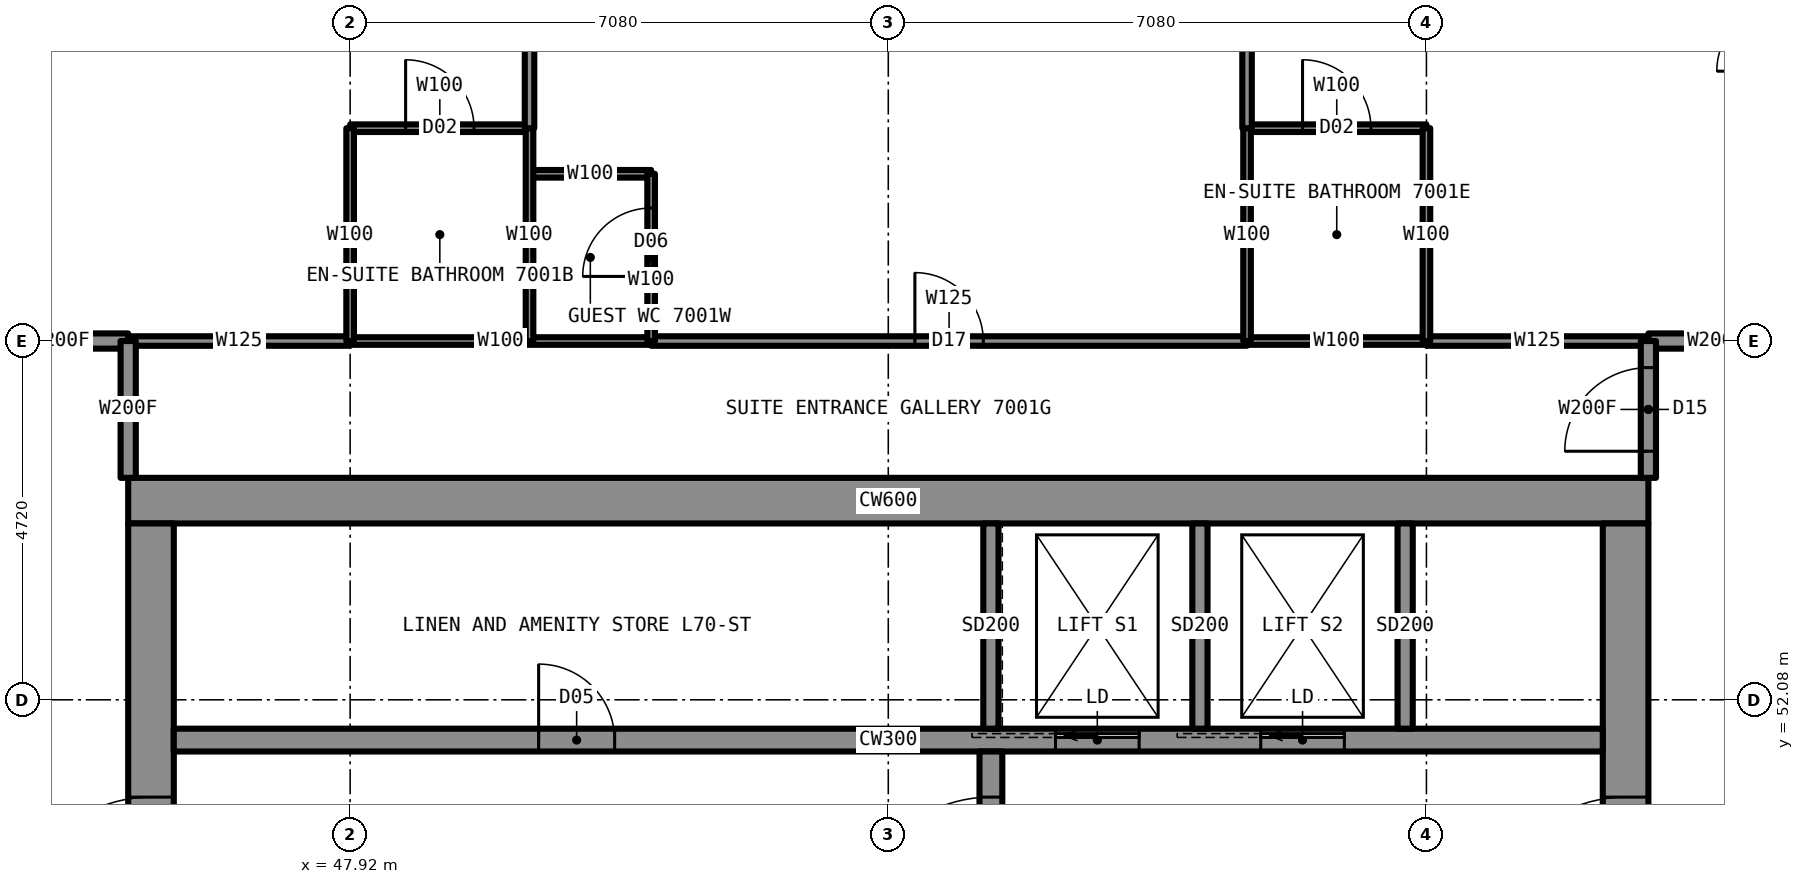
"""IFC4 building model, lengths in metres.
Left out: names, types, materials, properties, quantities, classifications, styles, units other than length and angle.
Written with IfcOpenShell. Run it as: python <this file> out.ifc"""

import sys

from ifc_helpers import new_model, si_unit, direction, frame, frame_2d, origin, place, context, subcontext, project, spatial, rectangle, extrude, element, fill, save


model = new_model("IFC4")
c1 = context("Model", 3, precision=1e-05, world=origin(), true_north=direction((0.0, 1.0)))
c2 = subcontext(c1, "Body", "Model", "MODEL_VIEW")
j1 = project(units=[si_unit("LENGTHUNIT", "METRE"), si_unit("PLANEANGLEUNIT", "RADIAN")], contexts=[c1])
p1 = place(None, origin())
s1 = spatial("IfcSite", under=j1, at=p1, CompositionType="ELEMENT")
p2 = place(p1, origin())
s2 = spatial("IfcBuilding", under=s1, at=p2, CompositionType="ELEMENT")
p3 = place(p2, frame((0.0, 0.0, 254.7)))
s3 = spatial("IfcBuildingStorey", under=s2, at=p3, CompositionType="ELEMENT", Elevation=254.7)
p4 = place(p3, frame((45.0, 54.7, 0.0), z_axis=(0.0, 0.0, 1.0), x_axis=(1.0, 0.0, 0.0)))
e1 = element("IfcWall", 1, at=p4, inside=s3, PredefinedType="SHEAR", context=c2, shape_type="SweptSolid", body=[
    extrude(rectangle(XDim=20.0, YDim=0.6, at=frame_2d((10.0, 0.0))), origin(), (0.0, 0.0, 1.0), 3.5),
])
p5 = place(p3, frame((64.7, 35.6, 0.0), z_axis=(0.0, 0.0, 1.0), x_axis=(0.0, 1.0, 0.0)))
e2 = element("IfcWall", 2, at=p5, inside=s3, PredefinedType="SHEAR", context=c2, shape_type="SweptSolid", body=[
    extrude(rectangle(XDim=18.8, YDim=0.6, at=frame_2d((9.4, 0.0))), origin(), (0.0, 0.0, 1.0), 3.5),
])
p6 = place(p5, frame((13.4, 0.0, 0.0)))
e3 = element("IfcOpeningElement", 3, at=p6, cuts=e2, PredefinedType="OPENING", context=c2, shape_type="SweptSolid", body=[
    extrude(rectangle(XDim=1.8, YDim=2.2, at=frame_2d((0.9, 1.1))), frame((0.0, 0.31, 0.0), z_axis=(0.0, -1.0, 0.0), x_axis=(1.0, 0.0, 0.0)), (0.0, 0.0, 1.0), 0.62),
])
p7 = place(p5, frame((3.6, 0.0, 0.0)))
e4 = element("IfcOpeningElement", 4, at=p7, cuts=e2, PredefinedType="OPENING", context=c2, shape_type="SweptSolid", body=[
    extrude(rectangle(XDim=1.8, YDim=2.2, at=frame_2d((0.9, 1.1))), frame((0.0, 0.31, 0.0), z_axis=(0.0, -1.0, 0.0), x_axis=(1.0, 0.0, 0.0)), (0.0, 0.0, 1.0), 0.62),
])
p8 = place(p3, frame((45.3, 35.6, 0.0), z_axis=(0.0, 0.0, 1.0), x_axis=(0.0, 1.0, 0.0)))
e5 = element("IfcWall", 5, at=p8, inside=s3, PredefinedType="SHEAR", context=c2, shape_type="SweptSolid", body=[
    extrude(rectangle(XDim=18.8, YDim=0.6, at=frame_2d((9.4, 0.0))), origin(), (0.0, 0.0, 1.0), 3.5),
])
p9 = place(p8, frame((13.4, 0.0, 0.0)))
e6 = element("IfcOpeningElement", 6, at=p9, cuts=e5, PredefinedType="OPENING", context=c2, shape_type="SweptSolid", body=[
    extrude(rectangle(XDim=1.8, YDim=2.2, at=frame_2d((0.9, 1.1))), frame((0.0, 0.31, 0.0), z_axis=(0.0, -1.0, 0.0), x_axis=(1.0, 0.0, 0.0)), (0.0, 0.0, 1.0), 0.62),
])
p10 = place(p8, frame((3.6, 0.0, 0.0)))
e7 = element("IfcOpeningElement", 7, at=p10, cuts=e5, PredefinedType="OPENING", context=c2, shape_type="SweptSolid", body=[
    extrude(rectangle(XDim=1.8, YDim=2.2, at=frame_2d((0.9, 1.1))), frame((0.0, 0.31, 0.0), z_axis=(0.0, -1.0, 0.0), x_axis=(1.0, 0.0, 0.0)), (0.0, 0.0, 1.0), 0.62),
])
p11 = place(p8, frame((6.4, 0.0, 0.0)))
e8 = element("IfcOpeningElement", 8, at=p11, cuts=e5, PredefinedType="OPENING", context=c2, shape_type="SweptSolid", body=[
    extrude(rectangle(XDim=1.2, YDim=2.2, at=frame_2d((0.6, 1.1))), frame((0.0, 0.31, 0.0), z_axis=(0.0, -1.0, 0.0), x_axis=(1.0, 0.0, 0.0)), (0.0, 0.0, 1.0), 0.62),
])
p12 = place(p3, frame((45.6, 51.55, 0.0), z_axis=(0.0, 0.0, 1.0), x_axis=(1.0, 0.0, 0.0)))
e9 = element("IfcWall", 9, at=p12, inside=s3, PredefinedType="SHEAR", context=c2, shape_type="SweptSolid", body=[
    extrude(rectangle(XDim=18.8, YDim=0.3, at=frame_2d((9.4, 0.0))), origin(), (0.0, 0.0, 1.0), 3.5),
])
p13 = place(p12, frame((4.8, 0.0, 0.0)))
e10 = element("IfcOpeningElement", 10, at=p13, cuts=e9, PredefinedType="OPENING", context=c2, shape_type="SweptSolid", body=[
    extrude(rectangle(XDim=1.0, YDim=2.1, at=frame_2d((0.5, 1.05))), frame((0.0, 0.16, 0.0), z_axis=(0.0, -1.0, 0.0), x_axis=(1.0, 0.0, 0.0)), (0.0, 0.0, 1.0), 0.32),
])
p14 = place(p12, frame((11.6, 0.0, 0.0)))
e11 = element("IfcOpeningElement", 11, at=p14, cuts=e9, PredefinedType="OPENING", context=c2, shape_type="SweptSolid", body=[
    extrude(rectangle(XDim=1.1, YDim=2.2, at=frame_2d((0.55, 1.1))), frame((0.0, 0.16, 0.0), z_axis=(0.0, -1.0, 0.0), x_axis=(1.0, 0.0, 0.0)), (0.0, 0.0, 1.0), 0.32),
])
p15 = place(p12, frame((14.3, 0.0, 0.0)))
e12 = element("IfcOpeningElement", 12, at=p15, cuts=e9, PredefinedType="OPENING", context=c2, shape_type="SweptSolid", body=[
    extrude(rectangle(XDim=1.1, YDim=2.2, at=frame_2d((0.55, 1.1))), frame((0.0, 0.16, 0.0), z_axis=(0.0, -1.0, 0.0), x_axis=(1.0, 0.0, 0.0)), (0.0, 0.0, 1.0), 0.32),
])
p16 = place(p3, frame((56.35, 41.9, 0.0), z_axis=(0.0, 0.0, 1.0), x_axis=(0.0, 1.0, 0.0)))
e13 = element("IfcWall", 13, at=p16, inside=s3, PredefinedType="SHEAR", context=c2, shape_type="SweptSolid", body=[
    extrude(rectangle(XDim=9.5, YDim=0.3, at=frame_2d((4.75, 0.0))), origin(), (0.0, 0.0, 1.0), 3.5),
])
p17 = place(p16, frame((7.1, 0.0, 0.0)))
e14 = element("IfcOpeningElement", 14, at=p17, cuts=e13, PredefinedType="OPENING", context=c2, shape_type="SweptSolid", body=[
    extrude(rectangle(XDim=1.8, YDim=2.2, at=frame_2d((0.9, 1.1))), frame((0.0, 0.16, 0.0), z_axis=(0.0, -1.0, 0.0), x_axis=(1.0, 0.0, 0.0)), (0.0, 0.0, 1.0), 0.32),
])
p18 = place(p3, frame((47.92, 56.8, 0.0), z_axis=(0.0, 0.0, 1.0), x_axis=(1.0, 0.0, 0.0)))
e15 = element("IfcWall", 15, at=p18, inside=s3, PredefinedType="PARTITIONING", context=c2, shape_type="SweptSolid", body=[
    extrude(rectangle(XDim=3.96, YDim=0.1, at=frame_2d((1.98, 0.0))), origin(), (0.0, 0.0, 1.0), 3.33),
])
p19 = place(p3, frame((59.72, 56.8, 0.0), z_axis=(0.0, 0.0, 1.0), x_axis=(1.0, 0.0, 0.0)))
e16 = element("IfcWall", 16, at=p19, inside=s3, PredefinedType="PARTITIONING", context=c2, shape_type="SweptSolid", body=[
    extrude(rectangle(XDim=2.36, YDim=0.1, at=frame_2d((1.18, 0.0))), origin(), (0.0, 0.0, 1.0), 3.33),
])
for number, where, z_axis, x_axis in (
    (17, (43.22, 56.8, 0.0), (0.0, 0.0, 1.0), (1.0, 0.0, 0.0)),
    (18, (65.0, 56.8, 0.0), (0.0, 0.0, 1.0), (1.0, 0.0, 0.0)),
):
    element("IfcWall", number, at=place(p3, frame(where, z_axis=z_axis, x_axis=x_axis)), inside=s3, PredefinedType="PARTITIONING", context=c2, shape_type="SweptSolid", body=[
        extrude(rectangle(XDim=1.78, YDim=0.2, at=frame_2d((0.89, 0.0))), origin(), (0.0, 0.0, 1.0), 3.33),
    ])
p20 = place(p3, frame((45.0, 56.8, 0.0), z_axis=(0.0, 0.0, 1.0), x_axis=(1.0, 0.0, 0.0)))
e19 = element("IfcWall", 19, at=p20, inside=s3, PredefinedType="PARTITIONING", context=c2, shape_type="SweptSolid", body=[
    extrude(rectangle(XDim=2.92, YDim=0.125, at=frame_2d((1.46, 0.0))), origin(), (0.0, 0.0, 1.0), 3.33),
])
p21 = place(p3, frame((51.88, 56.8, 0.0), z_axis=(0.0, 0.0, 1.0), x_axis=(1.0, 0.0, 0.0)))
e20 = element("IfcWall", 20, at=p21, inside=s3, PredefinedType="PARTITIONING", context=c2, shape_type="SweptSolid", body=[
    extrude(rectangle(XDim=7.84, YDim=0.125, at=frame_2d((3.92, 0.0))), origin(), (0.0, 0.0, 1.0), 3.33),
])
p22 = place(p21, frame((3.47, 0.0, 0.0)))
e21 = element("IfcOpeningElement", 21, at=p22, cuts=e20, PredefinedType="OPENING", context=c2, shape_type="SweptSolid", body=[
    extrude(rectangle(XDim=0.9, YDim=2.2, at=frame_2d((0.45, 1.1))), frame((0.0, 0.073, 0.0), z_axis=(0.0, -1.0, 0.0), x_axis=(1.0, 0.0, 0.0)), (0.0, 0.0, 1.0), 0.145),
])
p23 = place(p3, frame((62.08, 56.8, 0.0), z_axis=(0.0, 0.0, 1.0), x_axis=(1.0, 0.0, 0.0)))
e22 = element("IfcWall", 22, at=p23, inside=s3, PredefinedType="PARTITIONING", context=c2, shape_type="SweptSolid", body=[
    extrude(rectangle(XDim=2.92, YDim=0.125, at=frame_2d((1.46, 0.0))), origin(), (0.0, 0.0, 1.0), 3.33),
])
p24 = place(p3, frame((50.28, 59.0, 0.0), z_axis=(0.0, 0.0, 1.0), x_axis=(1.0, 0.0, 0.0)))
e23 = element("IfcWall", 23, at=p24, inside=s3, PredefinedType="PARTITIONING", context=c2, shape_type="SweptSolid", body=[
    extrude(rectangle(XDim=1.6, YDim=0.1, at=frame_2d((0.8, 0.0))), origin(), (0.0, 0.0, 1.0), 3.33),
])
p25 = place(p3, frame((47.92, 59.6, 0.0), z_axis=(0.0, 0.0, 1.0), x_axis=(1.0, 0.0, 0.0)))
e24 = element("IfcWall", 24, at=p25, inside=s3, PredefinedType="PARTITIONING", context=c2, shape_type="SweptSolid", body=[
    extrude(rectangle(XDim=2.36, YDim=0.1, at=frame_2d((1.18, 0.0))), origin(), (0.0, 0.0, 1.0), 3.33),
])
p26 = place(p25, frame((0.73, 0.0, 0.0)))
e25 = element("IfcOpeningElement", 25, at=p26, cuts=e24, PredefinedType="OPENING", context=c2, shape_type="SweptSolid", body=[
    extrude(rectangle(XDim=0.9, YDim=2.1, at=frame_2d((0.45, 1.05))), frame((0.0, 0.06, 0.0), z_axis=(0.0, -1.0, 0.0), x_axis=(1.0, 0.0, 0.0)), (0.0, 0.0, 1.0), 0.12),
])
p27 = place(p3, frame((59.72, 59.6, 0.0), z_axis=(0.0, 0.0, 1.0), x_axis=(1.0, 0.0, 0.0)))
e26 = element("IfcWall", 26, at=p27, inside=s3, PredefinedType="PARTITIONING", context=c2, shape_type="SweptSolid", body=[
    extrude(rectangle(XDim=2.36, YDim=0.1, at=frame_2d((1.18, 0.0))), origin(), (0.0, 0.0, 1.0), 3.33),
])
p28 = place(p27, frame((0.73, 0.0, 0.0)))
e27 = element("IfcOpeningElement", 27, at=p28, cuts=e26, PredefinedType="OPENING", context=c2, shape_type="SweptSolid", body=[
    extrude(rectangle(XDim=0.9, YDim=2.1, at=frame_2d((0.45, 1.05))), frame((0.0, 0.06, 0.0), z_axis=(0.0, -1.0, 0.0), x_axis=(1.0, 0.0, 0.0)), (0.0, 0.0, 1.0), 0.12),
])
p29 = place(p3, frame((45.0, 55.0, 0.0), z_axis=(0.0, 0.0, 1.0), x_axis=(0.0, 1.0, 0.0)))
e28 = element("IfcWall", 28, at=p29, inside=s3, PredefinedType="PARTITIONING", context=c2, shape_type="SweptSolid", body=[
    extrude(rectangle(XDim=1.8, YDim=0.2, at=frame_2d((0.9, 0.0))), origin(), (0.0, 0.0, 1.0), 3.33),
])
p30 = place(p3, frame((51.88, 56.8, 0.0), z_axis=(0.0, 0.0, 1.0), x_axis=(0.0, 1.0, 0.0)))
e29 = element("IfcWall", 29, at=p30, inside=s3, PredefinedType="PARTITIONING", context=c2, shape_type="SweptSolid", body=[
    extrude(rectangle(XDim=2.2, YDim=0.1, at=frame_2d((1.1, 0.0))), origin(), (0.0, 0.0, 1.0), 3.33),
])
p31 = place(p30, frame((0.85, 0.0, 0.0)))
e30 = element("IfcOpeningElement", 30, at=p31, cuts=e29, PredefinedType="OPENING", context=c2, shape_type="SweptSolid", body=[
    extrude(rectangle(XDim=0.9, YDim=2.1, at=frame_2d((0.45, 1.05))), frame((0.0, 0.06, 0.0), z_axis=(0.0, -1.0, 0.0), x_axis=(1.0, 0.0, 0.0)), (0.0, 0.0, 1.0), 0.12),
])
p32 = place(p3, frame((50.28, 56.8, 0.0), z_axis=(0.0, 0.0, 1.0), x_axis=(0.0, 1.0, 0.0)))
e31 = element("IfcWall", 31, at=p32, inside=s3, PredefinedType="PARTITIONING", context=c2, shape_type="SweptSolid", body=[
    extrude(rectangle(XDim=2.8, YDim=0.1, at=frame_2d((1.4, 0.0))), origin(), (0.0, 0.0, 1.0), 3.33),
])
p33 = place(p3, frame((50.28, 59.6, 0.0), z_axis=(0.0, 0.0, 1.0), x_axis=(0.0, 1.0, 0.0)))
e32 = element("IfcWall", 32, at=p33, inside=s3, PredefinedType="PARTITIONING", context=c2, shape_type="SweptSolid", body=[
    extrude(rectangle(XDim=3.1, YDim=0.125, at=frame_2d((1.55, 0.0))), origin(), (0.0, 0.0, 1.0), 3.33),
])
p34 = place(p33, frame((1.25, 0.0, 0.0)))
e33 = element("IfcOpeningElement", 33, at=p34, cuts=e32, PredefinedType="OPENING", context=c2, shape_type="SweptSolid", body=[
    extrude(rectangle(XDim=0.9, YDim=2.2, at=frame_2d((0.45, 1.1))), frame((0.0, 0.073, 0.0), z_axis=(0.0, -1.0, 0.0), x_axis=(1.0, 0.0, 0.0)), (0.0, 0.0, 1.0), 0.145),
])
p35 = place(p3, frame((47.92, 56.8, 0.0), z_axis=(0.0, 0.0, 1.0), x_axis=(0.0, 1.0, 0.0)))
e34 = element("IfcWall", 34, at=p35, inside=s3, PredefinedType="PARTITIONING", context=c2, shape_type="SweptSolid", body=[
    extrude(rectangle(XDim=2.8, YDim=0.1, at=frame_2d((1.4, 0.0))), origin(), (0.0, 0.0, 1.0), 2.573),
])
p36 = place(p3, frame((65.0, 55.0, 0.0), z_axis=(0.0, 0.0, 1.0), x_axis=(0.0, 1.0, 0.0)))
e35 = element("IfcWall", 35, at=p36, inside=s3, PredefinedType="PARTITIONING", context=c2, shape_type="SweptSolid", body=[
    extrude(rectangle(XDim=1.8, YDim=0.2, at=frame_2d((0.9, 0.0))), origin(), (0.0, 0.0, 1.0), 3.33),
])
p37 = place(p36, frame((0.35, 0.0, 0.0)))
e36 = element("IfcOpeningElement", 36, at=p37, cuts=e35, PredefinedType="OPENING", context=c2, shape_type="SweptSolid", body=[
    extrude(rectangle(XDim=1.1, YDim=2.2, at=frame_2d((0.55, 1.1))), frame((0.0, 0.11, 0.0), z_axis=(0.0, -1.0, 0.0), x_axis=(1.0, 0.0, 0.0)), (0.0, 0.0, 1.0), 0.22),
])
p38 = place(p3, frame((59.72, 56.8, 0.0), z_axis=(0.0, 0.0, 1.0), x_axis=(0.0, 1.0, 0.0)))
e37 = element("IfcWall", 37, at=p38, inside=s3, PredefinedType="PARTITIONING", context=c2, shape_type="SweptSolid", body=[
    extrude(rectangle(XDim=2.8, YDim=0.1, at=frame_2d((1.4, 0.0))), origin(), (0.0, 0.0, 1.0), 3.33),
])
p39 = place(p3, frame((59.72, 59.6, 0.0), z_axis=(0.0, 0.0, 1.0), x_axis=(0.0, 1.0, 0.0)))
e38 = element("IfcWall", 38, at=p39, inside=s3, PredefinedType="PARTITIONING", context=c2, shape_type="SweptSolid", body=[
    extrude(rectangle(XDim=3.1, YDim=0.125, at=frame_2d((1.55, 0.0))), origin(), (0.0, 0.0, 1.0), 3.33),
])
p40 = place(p39, frame((1.25, 0.0, 0.0)))
e39 = element("IfcOpeningElement", 39, at=p40, cuts=e38, PredefinedType="OPENING", context=c2, shape_type="SweptSolid", body=[
    extrude(rectangle(XDim=0.9, YDim=2.2, at=frame_2d((0.45, 1.1))), frame((0.0, 0.073, 0.0), z_axis=(0.0, -1.0, 0.0), x_axis=(1.0, 0.0, 0.0)), (0.0, 0.0, 1.0), 0.145),
])
p41 = place(p3, frame((62.08, 56.8, 0.0), z_axis=(0.0, 0.0, 1.0), x_axis=(0.0, 1.0, 0.0)))
e40 = element("IfcWall", 40, at=p41, inside=s3, PredefinedType="PARTITIONING", context=c2, shape_type="SweptSolid", body=[
    extrude(rectangle(XDim=2.8, YDim=0.1, at=frame_2d((1.4, 0.0))), origin(), (0.0, 0.0, 1.0), 2.573),
])
for number, where, z_axis, x_axis in (
    (41, (59.1, 51.7, 0.0), (0.0, 0.0, 1.0), (0.0, 1.0, 0.0)),
    (42, (61.8, 51.7, 0.0), (0.0, 0.0, 1.0), (0.0, 1.0, 0.0)),
    (43, (56.35, 51.7, 0.0), (0.0, 0.0, 1.0), (0.0, 1.0, 0.0)),
):
    element("IfcWall", number, at=place(p3, frame(where, z_axis=z_axis, x_axis=x_axis)), inside=s3, PredefinedType="PARTITIONING", context=c2, shape_type="SweptSolid", body=[
        extrude(rectangle(XDim=2.7, YDim=0.2, at=frame_2d((1.35, 0.0))), origin(), (0.0, 0.0, 1.0), 3.33),
    ])
p42 = place(p22, origin())
e44 = element("IfcDoor", 44, at=p42, inside=s3, OperationType="SINGLE_SWING_LEFT", PredefinedType="DOOR", context=c2, shape_type="SweptSolid", body=[
    extrude(rectangle(XDim=0.9, YDim=2.2, at=frame_2d((0.45, 1.1))), frame((0.0, 0.025, 0.0), z_axis=(0.0, -1.0, 0.0), x_axis=(1.0, 0.0, 0.0)), (0.0, 0.0, 1.0), 0.05),
])
fill(e21, e44)
p43 = place(p26, origin())
e45 = element("IfcDoor", 45, at=p43, inside=s3, OperationType="SINGLE_SWING_RIGHT", PredefinedType="DOOR", context=c2, shape_type="SweptSolid", body=[
    extrude(rectangle(XDim=0.9, YDim=2.1, at=frame_2d((0.45, 1.05))), frame((0.0, 0.025, 0.0), z_axis=(0.0, -1.0, 0.0), x_axis=(1.0, 0.0, 0.0)), (0.0, 0.0, 1.0), 0.05),
])
fill(e25, e45)
p44 = place(p28, origin())
e46 = element("IfcDoor", 46, at=p44, inside=s3, OperationType="SINGLE_SWING_RIGHT", PredefinedType="DOOR", context=c2, shape_type="SweptSolid", body=[
    extrude(rectangle(XDim=0.9, YDim=2.1, at=frame_2d((0.45, 1.05))), frame((0.0, 0.025, 0.0), z_axis=(0.0, -1.0, 0.0), x_axis=(1.0, 0.0, 0.0)), (0.0, 0.0, 1.0), 0.05),
])
fill(e27, e46)
p45 = place(p37, origin())
e47 = element("IfcDoor", 47, at=p45, inside=s3, OperationType="SINGLE_SWING_LEFT", PredefinedType="DOOR", context=c2, shape_type="SweptSolid", body=[
    extrude(rectangle(XDim=1.1, YDim=2.2, at=frame_2d((0.55, 1.1))), frame((0.0, 0.025, 0.0), z_axis=(0.0, -1.0, 0.0), x_axis=(1.0, 0.0, 0.0)), (0.0, 0.0, 1.0), 0.05),
])
fill(e36, e47)
p46 = place(p31, origin())
e48 = element("IfcDoor", 48, at=p46, inside=s3, OperationType="SINGLE_SWING_LEFT", PredefinedType="DOOR", context=c2, shape_type="SweptSolid", body=[
    extrude(rectangle(XDim=0.9, YDim=2.1, at=frame_2d((0.45, 1.05))), frame((0.0, 0.025, 0.0), z_axis=(0.0, -1.0, 0.0), x_axis=(1.0, 0.0, 0.0)), (0.0, 0.0, 1.0), 0.05),
])
fill(e30, e48)
p47 = place(p9, origin())
e49 = element("IfcDoor", 49, at=p47, inside=s3, OperationType="DOUBLE_DOOR_SINGLE_SWING", PredefinedType="DOOR", context=c2, shape_type="SweptSolid", body=[
    extrude(rectangle(XDim=1.8, YDim=2.2, at=frame_2d((0.9, 1.1))), frame((0.0, 0.025, 0.0), z_axis=(0.0, -1.0, 0.0), x_axis=(1.0, 0.0, 0.0)), (0.0, 0.0, 1.0), 0.05),
])
fill(e6, e49)
p48 = place(p6, origin())
e50 = element("IfcDoor", 50, at=p48, inside=s3, OperationType="DOUBLE_DOOR_SINGLE_SWING", PredefinedType="DOOR", context=c2, shape_type="SweptSolid", body=[
    extrude(rectangle(XDim=1.8, YDim=2.2, at=frame_2d((0.9, 1.1))), frame((0.0, 0.025, 0.0), z_axis=(0.0, -1.0, 0.0), x_axis=(1.0, 0.0, 0.0)), (0.0, 0.0, 1.0), 0.05),
])
fill(e3, e50)
p49 = place(p17, origin())
e51 = element("IfcDoor", 51, at=p49, inside=s3, OperationType="DOUBLE_DOOR_SINGLE_SWING", PredefinedType="DOOR", context=c2, shape_type="SweptSolid", body=[
    extrude(rectangle(XDim=1.8, YDim=2.2, at=frame_2d((0.9, 1.1))), frame((0.0, 0.025, 0.0), z_axis=(0.0, -1.0, 0.0), x_axis=(1.0, 0.0, 0.0)), (0.0, 0.0, 1.0), 0.05),
])
fill(e14, e51)
p50 = place(p13, origin())
e52 = element("IfcDoor", 52, at=p50, inside=s3, OperationType="SINGLE_SWING_LEFT", PredefinedType="DOOR", context=c2, shape_type="SweptSolid", body=[
    extrude(rectangle(XDim=1.0, YDim=2.1, at=frame_2d((0.5, 1.05))), frame((0.0, 0.025, 0.0), z_axis=(0.0, -1.0, 0.0), x_axis=(1.0, 0.0, 0.0)), (0.0, 0.0, 1.0), 0.05),
])
fill(e10, e52)
p51 = place(p14, origin())
e53 = element("IfcDoor", 53, at=p51, inside=s3, OperationType="SLIDING_TO_LEFT", PredefinedType="DOOR", context=c2, shape_type="SweptSolid", body=[
    extrude(rectangle(XDim=1.1, YDim=2.2, at=frame_2d((0.55, 1.1))), frame((0.0, 0.025, 0.0), z_axis=(0.0, -1.0, 0.0), x_axis=(1.0, 0.0, 0.0)), (0.0, 0.0, 1.0), 0.05),
])
fill(e11, e53)
p52 = place(p15, origin())
e54 = element("IfcDoor", 54, at=p52, inside=s3, OperationType="SLIDING_TO_LEFT", PredefinedType="DOOR", context=c2, shape_type="SweptSolid", body=[
    extrude(rectangle(XDim=1.1, YDim=2.2, at=frame_2d((0.55, 1.1))), frame((0.0, 0.025, 0.0), z_axis=(0.0, -1.0, 0.0), x_axis=(1.0, 0.0, 0.0)), (0.0, 0.0, 1.0), 0.05),
])
fill(e12, e54)
save(model, sys.argv[1])
